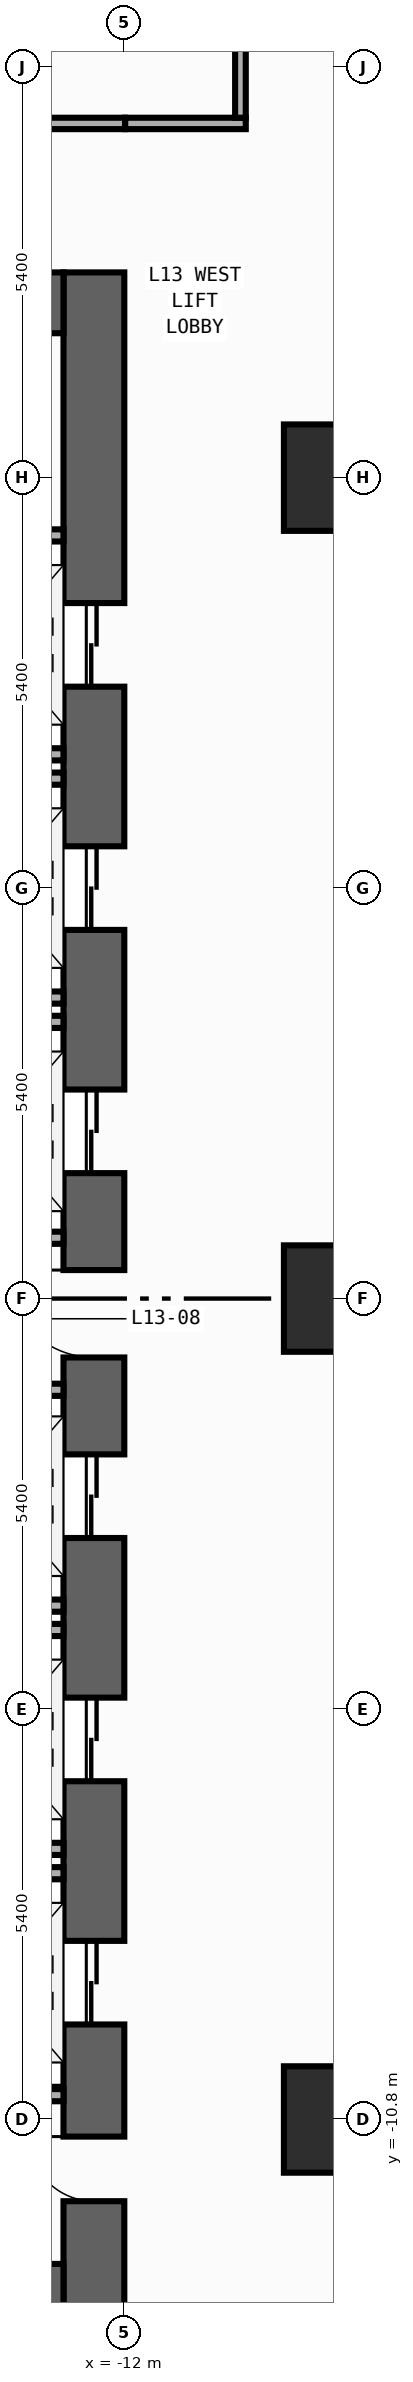
"""IFC4 building model, lengths in metres.
Left out: names, types, materials, properties, quantities, classifications, styles, units other than length and angle.
Written with IfcOpenShell. Run it as: python <this file> out.ifc"""

import sys

from ifc_helpers import new_model, si_unit, direction, frame, frame_2d, origin, origin_2d, place, context, subcontext, project, spatial, rectangle, extrude, element, fill, save


model = new_model("IFC4")
c1 = context("Model", 3, precision=1e-05, world=origin(), true_north=direction((0.0, 1.0)))
c2 = subcontext(c1, "Body", "Model", "MODEL_VIEW")
j1 = project(units=[si_unit("LENGTHUNIT", "METRE"), si_unit("PLANEANGLEUNIT", "RADIAN")], contexts=[c1])
p1 = place(None, origin())
s1 = spatial("IfcSite", under=j1, at=p1, CompositionType="ELEMENT")
p2 = place(p1, origin())
s2 = spatial("IfcBuilding", under=s1, at=p2, CompositionType="ELEMENT")
p3 = place(p2, frame((0.0, 0.0, 55.4)))
s3 = spatial("IfcBuildingStorey", under=s2, at=p3, CompositionType="ELEMENT", Elevation=55.4)
p4 = place(p3, frame((-12.4, -13.5, 0.0), z_axis=(0.0, 0.0, 1.0), x_axis=(0.0, 1.0, 0.0)))
e1 = element("IfcWall", 1, at=p4, inside=s3, PredefinedType="SHEAR", context=c2, shape_type="SweptSolid", body=[
    extrude(rectangle(XDim=27.0, YDim=0.8, at=frame_2d((13.5, 0.0))), origin(), (0.0, 0.0, 1.0), 3.94),
])
p5 = place(p4, frame((21.55, 0.0, 0.0)))
e2 = element("IfcOpeningElement", 2, at=p5, cuts=e1, PredefinedType="OPENING", context=c2, shape_type="SweptSolid", body=[
    extrude(rectangle(XDim=1.1, YDim=2.2, at=frame_2d((0.55, 1.1))), frame((0.0, 0.41, 0.0), z_axis=(0.0, -1.0, 0.0), x_axis=(1.0, 0.0, 0.0)), (0.0, 0.0, 1.0), 0.82),
])
p6 = place(p4, frame((18.35, 0.0, 0.0)))
e3 = element("IfcOpeningElement", 3, at=p6, cuts=e1, PredefinedType="OPENING", context=c2, shape_type="SweptSolid", body=[
    extrude(rectangle(XDim=1.1, YDim=2.2, at=frame_2d((0.55, 1.1))), frame((0.0, 0.41, 0.0), z_axis=(0.0, -1.0, 0.0), x_axis=(1.0, 0.0, 0.0)), (0.0, 0.0, 1.0), 0.82),
])
p7 = place(p4, frame((15.15, 0.0, 0.0)))
e4 = element("IfcOpeningElement", 4, at=p7, cuts=e1, PredefinedType="OPENING", context=c2, shape_type="SweptSolid", body=[
    extrude(rectangle(XDim=1.1, YDim=2.2, at=frame_2d((0.55, 1.1))), frame((0.0, 0.41, 0.0), z_axis=(0.0, -1.0, 0.0), x_axis=(1.0, 0.0, 0.0)), (0.0, 0.0, 1.0), 0.82),
])
p8 = place(p4, frame((10.35, 0.0, 0.0)))
e5 = element("IfcOpeningElement", 5, at=p8, cuts=e1, PredefinedType="OPENING", context=c2, shape_type="SweptSolid", body=[
    extrude(rectangle(XDim=1.1, YDim=2.2, at=frame_2d((0.55, 1.1))), frame((0.0, 0.41, 0.0), z_axis=(0.0, -1.0, 0.0), x_axis=(1.0, 0.0, 0.0)), (0.0, 0.0, 1.0), 0.82),
])
p9 = place(p4, frame((7.15, 0.0, 0.0)))
e6 = element("IfcOpeningElement", 6, at=p9, cuts=e1, PredefinedType="OPENING", context=c2, shape_type="SweptSolid", body=[
    extrude(rectangle(XDim=1.1, YDim=2.2, at=frame_2d((0.55, 1.1))), frame((0.0, 0.41, 0.0), z_axis=(0.0, -1.0, 0.0), x_axis=(1.0, 0.0, 0.0)), (0.0, 0.0, 1.0), 0.82),
])
p10 = place(p4, frame((3.95, 0.0, 0.0)))
e7 = element("IfcOpeningElement", 7, at=p10, cuts=e1, PredefinedType="OPENING", context=c2, shape_type="SweptSolid", body=[
    extrude(rectangle(XDim=1.1, YDim=2.2, at=frame_2d((0.55, 1.1))), frame((0.0, 0.41, 0.0), z_axis=(0.0, -1.0, 0.0), x_axis=(1.0, 0.0, 0.0)), (0.0, 0.0, 1.0), 0.82),
])
p11 = place(p4, frame((12.725, 0.0, 0.0)))
e8 = element("IfcOpeningElement", 8, at=p11, cuts=e1, PredefinedType="OPENING", context=c2, shape_type="SweptSolid", body=[
    extrude(rectangle(XDim=1.15, YDim=2.2, at=frame_2d((0.575, 1.1))), frame((0.0, 0.41, 0.0), z_axis=(0.0, -1.0, 0.0), x_axis=(1.0, 0.0, 0.0)), (0.0, 0.0, 1.0), 0.82),
])
p12 = place(p4, frame((1.625, 0.0, 0.0)))
e9 = element("IfcOpeningElement", 9, at=p12, cuts=e1, PredefinedType="OPENING", context=c2, shape_type="SweptSolid", body=[
    extrude(rectangle(XDim=0.85, YDim=2.1, at=frame_2d((0.425, 1.05))), frame((0.0, 0.41, 0.0), z_axis=(0.0, -1.0, 0.0), x_axis=(1.0, 0.0, 0.0)), (0.0, 0.0, 1.0), 0.82),
])
for number, where, z_axis, x_axis in (
    (10, (-19.6, -13.1, 0.0), (0.0, 0.0, 1.0), (1.0, 0.0, 0.0)),
    (11, (-19.6, 13.1, 0.0), (0.0, 0.0, 1.0), (1.0, 0.0, 0.0)),
):
    element("IfcWall", number, at=place(p3, frame(where, z_axis=z_axis, x_axis=x_axis)), inside=s3, PredefinedType="SHEAR", context=c2, shape_type="SweptSolid", body=[
        extrude(rectangle(XDim=6.8, YDim=0.8, at=frame_2d((3.4, 0.0))), origin(), (0.0, 0.0, 1.0), 3.94),
    ])
for number, where, z_axis, x_axis in (
    (12, (-9.2, -10.8, 0.0), (0.0, 0.0, 1.0), (1.0, 0.0, 0.0)),
    (13, (-9.2, 0.0, 0.0), (0.0, 0.0, 1.0), (1.0, 0.0, 0.0)),
    (14, (-9.2, 10.8, 0.0), (0.0, 0.0, 1.0), (1.0, 0.0, 0.0)),
):
    element("IfcColumn", number, at=place(p3, frame(where, z_axis=z_axis, x_axis=x_axis)), inside=s3, PredefinedType="COLUMN", context=c2, shape_type="SweptSolid", body=[
        extrude(rectangle(XDim=1.4, YDim=1.4, at=origin_2d()), origin(), (0.0, 0.0, 1.0), 4.2),
    ])
for number, where, z_axis, x_axis in (
    (15, (-14.99, 7.16, 0.0), (0.0, 0.0, 1.0), (1.0, 0.0, 0.0)),
    (16, (-14.99, 10.04, 0.0), (0.0, 0.0, 1.0), (1.0, 0.0, 0.0)),
    (17, (-14.99, 3.96, 0.0), (0.0, 0.0, 1.0), (1.0, 0.0, 0.0)),
    (18, (-14.99, 6.84, 0.0), (0.0, 0.0, 1.0), (1.0, 0.0, 0.0)),
    (19, (-14.99, 3.64, 0.0), (0.0, 0.0, 1.0), (1.0, 0.0, 0.0)),
    (20, (-14.99, -4.04, 0.0), (0.0, 0.0, 1.0), (1.0, 0.0, 0.0)),
    (21, (-14.99, -7.24, 0.0), (0.0, 0.0, 1.0), (1.0, 0.0, 0.0)),
    (22, (-14.99, -4.36, 0.0), (0.0, 0.0, 1.0), (1.0, 0.0, 0.0)),
    (23, (-14.99, -7.56, 0.0), (0.0, 0.0, 1.0), (1.0, 0.0, 0.0)),
):
    element("IfcWall", number, at=place(p3, frame(where, z_axis=z_axis, x_axis=x_axis)), inside=s3, PredefinedType="STANDARD", context=c2, shape_type="SweptSolid", body=[
        extrude(rectangle(XDim=2.19, YDim=0.16, at=frame_2d((1.095, 0.0))), origin(), (0.0, 0.0, 1.0), 3.94),
    ])
for number, where, z_axis, x_axis in (
    (24, (-15.4, 0.8, 0.0), (0.0, 0.0, 1.0), (1.0, 0.0, 0.0)),
    (25, (-15.4, -1.2, 0.0), (0.0, 0.0, 1.0), (1.0, 0.0, 0.0)),
    (26, (-15.4, -10.48, 0.0), (0.0, 0.0, 1.0), (1.0, 0.0, 0.0)),
):
    element("IfcWall", number, at=place(p3, frame(where, z_axis=z_axis, x_axis=x_axis)), inside=s3, PredefinedType="STANDARD", context=c2, shape_type="SweptSolid", body=[
        extrude(rectangle(XDim=2.6, YDim=0.16, at=frame_2d((1.3, 0.0))), origin(), (0.0, 0.0, 1.0), 3.94),
    ])
p13 = place(p3, frame((-11.99, 15.46, 0.0), z_axis=(0.0, 0.0, 1.0), x_axis=(1.0, 0.0, 0.0)))
e27 = element("IfcWall", 27, at=p13, inside=s3, PredefinedType="PARTITIONING", context=c2, shape_type="SweptSolid", body=[
    extrude(rectangle(XDim=1.588, YDim=0.15, at=frame_2d((0.794, 0.0))), origin(), (0.0, 0.0, 1.0), 3.94),
])
p14 = place(p3, frame((-20.64, 15.46, 0.0), z_axis=(0.0, 0.0, 1.0), x_axis=(1.0, 0.0, 0.0)))
e28 = element("IfcWall", 28, at=p14, inside=s3, PredefinedType="PARTITIONING", context=c2, shape_type="SweptSolid", body=[
    extrude(rectangle(XDim=8.65, YDim=0.15, at=frame_2d((4.325, 0.0))), origin(), (0.0, 0.0, 1.0), 3.94),
])
p15 = place(p14, frame((2.871, 0.0, 0.0)))
e29 = element("IfcOpeningElement", 29, at=p15, cuts=e28, PredefinedType="OPENING", context=c2, shape_type="SweptSolid", body=[
    extrude(rectangle(XDim=0.9, YDim=2.15, at=frame_2d((0.45, 1.075))), frame((0.0, 0.085, 0.0), z_axis=(0.0, -1.0, 0.0), x_axis=(1.0, 0.0, 0.0)), (0.0, 0.0, 1.0), 0.17),
])
p16 = place(p3, frame((-10.472, 15.535, 0.0), z_axis=(0.0, 0.0, 1.0), x_axis=(0.0, 1.0, 0.0)))
e30 = element("IfcWall", 30, at=p16, inside=s3, PredefinedType="PARTITIONING", context=c2, shape_type="SweptSolid", body=[
    extrude(rectangle(XDim=11.32, YDim=0.14, at=frame_2d((5.66, 0.0))), origin(), (0.0, 0.0, 1.0), 3.94),
])
p17 = place(p5, origin())
e31 = element("IfcDoor", 31, at=p17, inside=s3, OperationType="DOUBLE_DOOR_SLIDING", PredefinedType="DOOR", context=c2, shape_type="SweptSolid", body=[
    extrude(rectangle(XDim=1.1, YDim=2.2, at=frame_2d((0.55, 1.1))), frame((0.0, 0.025, 0.0), z_axis=(0.0, -1.0, 0.0), x_axis=(1.0, 0.0, 0.0)), (0.0, 0.0, 1.0), 0.05),
])
fill(e2, e31)
p18 = place(p6, origin())
e32 = element("IfcDoor", 32, at=p18, inside=s3, OperationType="DOUBLE_DOOR_SLIDING", PredefinedType="DOOR", context=c2, shape_type="SweptSolid", body=[
    extrude(rectangle(XDim=1.1, YDim=2.2, at=frame_2d((0.55, 1.1))), frame((0.0, 0.025, 0.0), z_axis=(0.0, -1.0, 0.0), x_axis=(1.0, 0.0, 0.0)), (0.0, 0.0, 1.0), 0.05),
])
fill(e3, e32)
p19 = place(p7, origin())
e33 = element("IfcDoor", 33, at=p19, inside=s3, OperationType="DOUBLE_DOOR_SLIDING", PredefinedType="DOOR", context=c2, shape_type="SweptSolid", body=[
    extrude(rectangle(XDim=1.1, YDim=2.2, at=frame_2d((0.55, 1.1))), frame((0.0, 0.025, 0.0), z_axis=(0.0, -1.0, 0.0), x_axis=(1.0, 0.0, 0.0)), (0.0, 0.0, 1.0), 0.05),
])
fill(e4, e33)
p20 = place(p8, origin())
e34 = element("IfcDoor", 34, at=p20, inside=s3, OperationType="DOUBLE_DOOR_SLIDING", PredefinedType="DOOR", context=c2, shape_type="SweptSolid", body=[
    extrude(rectangle(XDim=1.1, YDim=2.2, at=frame_2d((0.55, 1.1))), frame((0.0, 0.025, 0.0), z_axis=(0.0, -1.0, 0.0), x_axis=(1.0, 0.0, 0.0)), (0.0, 0.0, 1.0), 0.05),
])
fill(e5, e34)
p21 = place(p9, origin())
e35 = element("IfcDoor", 35, at=p21, inside=s3, OperationType="DOUBLE_DOOR_SLIDING", PredefinedType="DOOR", context=c2, shape_type="SweptSolid", body=[
    extrude(rectangle(XDim=1.1, YDim=2.2, at=frame_2d((0.55, 1.1))), frame((0.0, 0.025, 0.0), z_axis=(0.0, -1.0, 0.0), x_axis=(1.0, 0.0, 0.0)), (0.0, 0.0, 1.0), 0.05),
])
fill(e6, e35)
p22 = place(p10, origin())
e36 = element("IfcDoor", 36, at=p22, inside=s3, OperationType="DOUBLE_DOOR_SLIDING", PredefinedType="DOOR", context=c2, shape_type="SweptSolid", body=[
    extrude(rectangle(XDim=1.1, YDim=2.2, at=frame_2d((0.55, 1.1))), frame((0.0, 0.025, 0.0), z_axis=(0.0, -1.0, 0.0), x_axis=(1.0, 0.0, 0.0)), (0.0, 0.0, 1.0), 0.05),
])
fill(e7, e36)
p23 = place(p11, origin())
e37 = element("IfcDoor", 37, at=p23, inside=s3, OperationType="SINGLE_SWING_RIGHT", PredefinedType="DOOR", context=c2, shape_type="SweptSolid", body=[
    extrude(rectangle(XDim=1.15, YDim=2.2, at=frame_2d((0.575, 1.1))), frame((0.0, 0.025, 0.0), z_axis=(0.0, -1.0, 0.0), x_axis=(1.0, 0.0, 0.0)), (0.0, 0.0, 1.0), 0.05),
])
fill(e8, e37)
p24 = place(p12, origin())
e38 = element("IfcDoor", 38, at=p24, inside=s3, OperationType="SINGLE_SWING_RIGHT", PredefinedType="DOOR", context=c2, shape_type="SweptSolid", body=[
    extrude(rectangle(XDim=0.85, YDim=2.1, at=frame_2d((0.425, 1.05))), frame((0.0, 0.025, 0.0), z_axis=(0.0, -1.0, 0.0), x_axis=(1.0, 0.0, 0.0)), (0.0, 0.0, 1.0), 0.05),
])
fill(e9, e38)
save(model, sys.argv[1])
